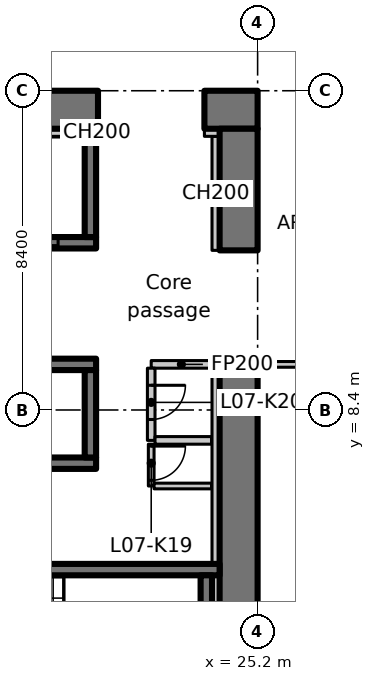
"""IFC4 building model, lengths in metres.
Left out: names, types, materials, properties, quantities, classifications, styles, units other than length and angle.
Written with IfcOpenShell. Run it as: python <this file> out.ifc"""

import sys

from ifc_helpers import new_model, si_unit, direction, frame, frame_2d, origin, place, context, subcontext, project, spatial, rectangle, extrude, element, fill, save


model = new_model("IFC4")
c1 = context("Model", 3, precision=1e-05, world=origin(), true_north=direction((0.0, 1.0)))
c2 = subcontext(c1, "Body", "Model", "MODEL_VIEW")
j1 = project(units=[si_unit("LENGTHUNIT", "METRE"), si_unit("PLANEANGLEUNIT", "RADIAN")], contexts=[c1])
p1 = place(None, origin())
s1 = spatial("IfcSite", under=j1, at=p1, CompositionType="ELEMENT")
p2 = place(p1, origin())
s2 = spatial("IfcBuilding", under=s1, at=p2, CompositionType="ELEMENT")
p3 = place(p2, frame((0.0, 0.0, 40.1)))
s3 = spatial("IfcBuildingStorey", under=s2, at=p3, CompositionType="ELEMENT", Elevation=40.1)
p4 = place(p3, frame((-1.1, 16.3, 0.0), z_axis=(0.0, 0.0, 1.0), x_axis=(1.0, 0.0, 0.0)))
e1 = element("IfcWall", 1, at=p4, inside=s3, PredefinedType="SHEAR", context=c2, shape_type="SweptSolid", body=[
    extrude(rectangle(XDim=22.1, YDim=1.0, at=frame_2d((11.05, 0.0))), origin(), (0.0, 0.0, 1.0), 3.35),
])
p5 = place(p4, frame((3.15, 0.0, 0.0)))
e2 = element("IfcOpeningElement", 2, at=p5, cuts=e1, PredefinedType="OPENING", context=c2, shape_type="SweptSolid", body=[
    extrude(rectangle(XDim=1.1, YDim=2.3, at=frame_2d((0.55, 1.15))), frame((0.0, 0.51, 0.0), z_axis=(0.0, -1.0, 0.0), x_axis=(1.0, 0.0, 0.0)), (0.0, 0.0, 1.0), 1.02),
])
p6 = place(p3, frame((23.8, 16.3, 0.0), z_axis=(0.0, 0.0, 1.0), x_axis=(1.0, 0.0, 0.0)))
e3 = element("IfcWall", 3, at=p6, inside=s3, PredefinedType="SHEAR", context=c2, shape_type="SweptSolid", body=[
    extrude(rectangle(XDim=1.4, YDim=1.0, at=frame_2d((0.7, 0.0))), origin(), (0.0, 0.0, 1.0), 3.35),
])
p7 = place(p3, frame((24.7, 1.0, 0.0), z_axis=(0.0, 0.0, 1.0), x_axis=(0.0, 1.0, 0.0)))
e4 = element("IfcWall", 4, at=p7, inside=s3, PredefinedType="SHEAR", context=c2, shape_type="SweptSolid", body=[
    extrude(rectangle(XDim=8.8, YDim=1.0, at=frame_2d((4.4, 0.0))), origin(), (0.0, 0.0, 1.0), 3.35),
])
p8 = place(p3, frame((24.7, 12.6, 0.0), z_axis=(0.0, 0.0, 1.0), x_axis=(0.0, 1.0, 0.0)))
e5 = element("IfcWall", 5, at=p8, inside=s3, PredefinedType="SHEAR", context=c2, shape_type="SweptSolid", body=[
    extrude(rectangle(XDim=3.2, YDim=1.0, at=frame_2d((1.6, 0.0))), origin(), (0.0, 0.0, 1.0), 3.35),
])
p9 = place(p3, frame((24.1, 12.6, 0.0), z_axis=(0.0, 0.0, 1.0), x_axis=(0.0, 1.0, 0.0)))
e6 = element("IfcWall", 6, at=p9, inside=s3, PredefinedType="PARTITIONING", context=c2, shape_type="SweptSolid", body=[
    extrude(rectangle(XDim=3.0, YDim=0.2, at=frame_2d((1.5, 0.0))), origin(), (0.0, 0.0, 1.0), 3.35),
])
p10 = place(p3, frame((23.8, 15.7, 0.0), z_axis=(0.0, 0.0, 1.0), x_axis=(1.0, 0.0, 0.0)))
e7 = element("IfcWall", 7, at=p10, inside=s3, PredefinedType="PARTITIONING", context=c2, shape_type="SweptSolid", body=[
    extrude(rectangle(XDim=0.4, YDim=0.2, at=frame_2d((0.2, 0.0))), origin(), (0.0, 0.0, 1.0), 3.35),
])
p11 = place(p3, frame((1.0, 7.0, 0.0), z_axis=(0.0, 0.0, 1.0), x_axis=(1.0, 0.0, 0.0)))
e8 = element("IfcWall", 8, at=p11, inside=s3, PredefinedType="SHEAR", context=c2, shape_type="SweptSolid", body=[
    extrude(rectangle(XDim=19.95, YDim=0.3, at=frame_2d((9.975, 0.0))), origin(), (0.0, 0.0, 1.0), 3.35),
])
p12 = place(p3, frame((1.0, 9.6, 0.0), z_axis=(0.0, 0.0, 1.0), x_axis=(1.0, 0.0, 0.0)))
e9 = element("IfcWall", 9, at=p12, inside=s3, PredefinedType="SHEAR", context=c2, shape_type="SweptSolid", body=[
    extrude(rectangle(XDim=19.95, YDim=0.3, at=frame_2d((9.975, 0.0))), origin(), (0.0, 0.0, 1.0), 3.35),
])
p13 = place(p12, frame((1.05, 0.0, 0.0)))
e10 = element("IfcOpeningElement", 10, at=p13, cuts=e9, PredefinedType="OPENING", context=c2, shape_type="SweptSolid", body=[
    extrude(rectangle(XDim=1.1, YDim=2.3, at=frame_2d((0.55, 1.15))), frame((0.0, 0.16, 0.0), z_axis=(0.0, -1.0, 0.0), x_axis=(1.0, 0.0, 0.0)), (0.0, 0.0, 1.0), 0.32),
])
p14 = place(p12, frame((3.85, 0.0, 0.0)))
e11 = element("IfcOpeningElement", 11, at=p14, cuts=e9, PredefinedType="OPENING", context=c2, shape_type="SweptSolid", body=[
    extrude(rectangle(XDim=1.1, YDim=2.3, at=frame_2d((0.55, 1.15))), frame((0.0, 0.16, 0.0), z_axis=(0.0, -1.0, 0.0), x_axis=(1.0, 0.0, 0.0)), (0.0, 0.0, 1.0), 0.32),
])
p15 = place(p12, frame((6.65, 0.0, 0.0)))
e12 = element("IfcOpeningElement", 12, at=p15, cuts=e9, PredefinedType="OPENING", context=c2, shape_type="SweptSolid", body=[
    extrude(rectangle(XDim=1.1, YDim=2.3, at=frame_2d((0.55, 1.15))), frame((0.0, 0.16, 0.0), z_axis=(0.0, -1.0, 0.0), x_axis=(1.0, 0.0, 0.0)), (0.0, 0.0, 1.0), 0.32),
])
p16 = place(p12, frame((9.45, 0.0, 0.0)))
e13 = element("IfcOpeningElement", 13, at=p16, cuts=e9, PredefinedType="OPENING", context=c2, shape_type="SweptSolid", body=[
    extrude(rectangle(XDim=1.1, YDim=2.3, at=frame_2d((0.55, 1.15))), frame((0.0, 0.16, 0.0), z_axis=(0.0, -1.0, 0.0), x_axis=(1.0, 0.0, 0.0)), (0.0, 0.0, 1.0), 0.32),
])
p17 = place(p12, frame((12.25, 0.0, 0.0)))
e14 = element("IfcOpeningElement", 14, at=p17, cuts=e9, PredefinedType="OPENING", context=c2, shape_type="SweptSolid", body=[
    extrude(rectangle(XDim=1.1, YDim=2.3, at=frame_2d((0.55, 1.15))), frame((0.0, 0.16, 0.0), z_axis=(0.0, -1.0, 0.0), x_axis=(1.0, 0.0, 0.0)), (0.0, 0.0, 1.0), 0.32),
])
p18 = place(p12, frame((15.05, 0.0, 0.0)))
e15 = element("IfcOpeningElement", 15, at=p18, cuts=e9, PredefinedType="OPENING", context=c2, shape_type="SweptSolid", body=[
    extrude(rectangle(XDim=1.1, YDim=2.3, at=frame_2d((0.55, 1.15))), frame((0.0, 0.16, 0.0), z_axis=(0.0, -1.0, 0.0), x_axis=(1.0, 0.0, 0.0)), (0.0, 0.0, 1.0), 0.32),
])
p19 = place(p3, frame((20.8, 7.15, 0.0), z_axis=(0.0, 0.0, 1.0), x_axis=(0.0, 1.0, 0.0)))
e16 = element("IfcWall", 16, at=p19, inside=s3, PredefinedType="SHEAR", context=c2, shape_type="SweptSolid", body=[
    extrude(rectangle(XDim=2.3, YDim=0.3, at=frame_2d((1.15, 0.0))), origin(), (0.0, 0.0, 1.0), 3.35),
])
p20 = place(p3, frame((15.05, 12.8, 0.0), z_axis=(0.0, 0.0, 1.0), x_axis=(1.0, 0.0, 0.0)))
e17 = element("IfcWall", 17, at=p20, inside=s3, PredefinedType="SHEAR", context=c2, shape_type="SweptSolid", body=[
    extrude(rectangle(XDim=5.9, YDim=0.3, at=frame_2d((2.95, 0.0))), origin(), (0.0, 0.0, 1.0), 3.35),
])
p21 = place(p20, frame((3.8, 0.0, 0.0)))
e18 = element("IfcOpeningElement", 18, at=p21, cuts=e17, PredefinedType="OPENING", context=c2, shape_type="SweptSolid", body=[
    extrude(rectangle(XDim=1.1, YDim=2.3, at=frame_2d((0.55, 1.15))), frame((0.0, 0.16, 0.0), z_axis=(0.0, -1.0, 0.0), x_axis=(1.0, 0.0, 0.0)), (0.0, 0.0, 1.0), 0.32),
])
p22 = place(p3, frame((20.8, 12.95, 0.0), z_axis=(0.0, 0.0, 1.0), x_axis=(0.0, 1.0, 0.0)))
e19 = element("IfcWall", 19, at=p22, inside=s3, PredefinedType="SHEAR", context=c2, shape_type="SweptSolid", body=[
    extrude(rectangle(XDim=2.85, YDim=0.3, at=frame_2d((1.425, 0.0))), origin(), (0.0, 0.0, 1.0), 3.35),
])
p23 = place(p3, frame((15.8, 4.2, 0.0), z_axis=(0.0, 0.0, 1.0), x_axis=(1.0, 0.0, 0.0)))
e20 = element("IfcWall", 20, at=p23, inside=s3, PredefinedType="SHEAR", context=c2, shape_type="SweptSolid", body=[
    extrude(rectangle(XDim=8.4, YDim=0.3, at=frame_2d((4.2, 0.0))), origin(), (0.0, 0.0, 1.0), 3.35),
])
p24 = place(p23, frame((0.4, 0.0, 0.0)))
e21 = element("IfcOpeningElement", 21, at=p24, cuts=e20, PredefinedType="OPENING", context=c2, shape_type="SweptSolid", body=[
    extrude(rectangle(XDim=1.0, YDim=2.1, at=frame_2d((0.5, 1.05))), frame((0.0, 0.16, 0.0), z_axis=(0.0, -1.0, 0.0), x_axis=(1.0, 0.0, 0.0)), (0.0, 0.0, 1.0), 0.32),
])
p25 = place(p3, frame((23.85, 1.5, 0.0), z_axis=(0.0, 0.0, 1.0), x_axis=(0.0, 1.0, 0.0)))
e22 = element("IfcWall", 22, at=p25, inside=s3, PredefinedType="SHEAR", context=c2, shape_type="SweptSolid", body=[
    extrude(rectangle(XDim=2.55, YDim=0.3, at=frame_2d((1.275, 0.0))), origin(), (0.0, 0.0, 1.0), 3.35),
])
p26 = place(p3, frame((23.988, 9.6, 0.0), z_axis=(0.0, 0.0, 1.0), x_axis=(-1.0, 0.0, 0.0)))
e23 = element("IfcWall", 23, at=p26, inside=s3, PredefinedType="PARTITIONING", context=c2, shape_type="SweptSolid", body=[
    extrude(rectangle(XDim=1.588, YDim=0.2, at=frame_2d((0.794, 0.0))), origin(), (0.0, 0.0, 1.0), 3.35),
])
p27 = place(p3, frame((22.4, 9.5, 0.0), z_axis=(0.0, 0.0, 1.0), x_axis=(0.0, -1.0, 0.0)))
e24 = element("IfcWall", 24, at=p27, inside=s3, PredefinedType="PARTITIONING", context=c2, shape_type="SweptSolid", body=[
    extrude(rectangle(XDim=1.9, YDim=0.2, at=frame_2d((0.95, 0.0))), origin(), (0.0, 0.0, 1.0), 3.35),
])
p28 = place(p27, frame((0.45, 0.0, 0.0)))
e25 = element("IfcOpeningElement", 25, at=p28, cuts=e24, PredefinedType="OPENING", context=c2, shape_type="SweptSolid", body=[
    extrude(rectangle(XDim=0.9, YDim=2.1, at=frame_2d((0.45, 1.05))), frame((0.0, 0.11, 0.0), z_axis=(0.0, -1.0, 0.0), x_axis=(1.0, 0.0, 0.0)), (0.0, 0.0, 1.0), 0.22),
])
p29 = place(p3, frame((22.5, 7.6, 0.0), z_axis=(0.0, 0.0, 1.0), x_axis=(1.0, 0.0, 0.0)))
e26 = element("IfcWall", 26, at=p29, inside=s3, PredefinedType="PARTITIONING", context=c2, shape_type="SweptSolid", body=[
    extrude(rectangle(XDim=1.488, YDim=0.2, at=frame_2d((0.744, 0.0))), origin(), (0.0, 0.0, 1.0), 3.35),
])
p30 = place(p3, frame((22.4, 7.5, 0.0), z_axis=(0.0, 0.0, 1.0), x_axis=(0.0, -1.0, 0.0)))
e27 = element("IfcWall", 27, at=p30, inside=s3, PredefinedType="PARTITIONING", context=c2, shape_type="SweptSolid", body=[
    extrude(rectangle(XDim=1.1, YDim=0.15, at=frame_2d((0.55, 0.0))), origin(), (0.0, 0.0, 1.0), 3.35),
])
p31 = place(p30, frame((0.05, 0.0, 0.0)))
e28 = element("IfcOpeningElement", 28, at=p31, cuts=e27, PredefinedType="OPENING", context=c2, shape_type="SweptSolid", body=[
    extrude(rectangle(XDim=0.9, YDim=2.1, at=frame_2d((0.45, 1.05))), frame((0.0, 0.085, 0.0), z_axis=(0.0, -1.0, 0.0), x_axis=(1.0, 0.0, 0.0)), (0.0, 0.0, 1.0), 0.17),
])
p32 = place(p3, frame((22.475, 6.4, 0.0), z_axis=(0.0, 0.0, 1.0), x_axis=(1.0, 0.0, 0.0)))
e29 = element("IfcWall", 29, at=p32, inside=s3, PredefinedType="PARTITIONING", context=c2, shape_type="SweptSolid", body=[
    extrude(rectangle(XDim=1.513, YDim=0.15, at=frame_2d((0.756, 0.0))), origin(), (0.0, 0.0, 1.0), 3.35),
])
p33 = place(p3, frame((18.15, 15.7, 0.0), z_axis=(0.0, 0.0, 1.0), x_axis=(1.0, 0.0, 0.0)))
e30 = element("IfcWall", 30, at=p33, inside=s3, PredefinedType="PARTITIONING", context=c2, shape_type="SweptSolid", body=[
    extrude(rectangle(XDim=2.5, YDim=0.2, at=frame_2d((1.25, 0.0))), origin(), (0.0, 0.0, 1.0), 3.35),
])
p34 = place(p3, frame((20.95, 15.7, 0.0), z_axis=(0.0, 0.0, 1.0), x_axis=(1.0, 0.0, 0.0)))
e31 = element("IfcWall", 31, at=p34, inside=s3, PredefinedType="PARTITIONING", context=c2, shape_type="SweptSolid", body=[
    extrude(rectangle(XDim=0.05, YDim=0.2, at=frame_2d((0.025, 0.0))), origin(), (0.0, 0.0, 1.0), 3.35),
])
p35 = place(p3, frame((24.1, 1.5, 0.0), z_axis=(0.0, 0.0, 1.0), x_axis=(0.0, 1.0, 0.0)))
e32 = element("IfcWall", 32, at=p35, inside=s3, PredefinedType="PARTITIONING", context=c2, shape_type="SweptSolid", body=[
    extrude(rectangle(XDim=2.55, YDim=0.2, at=frame_2d((1.275, 0.0))), origin(), (0.0, 0.0, 1.0), 3.35),
])
p36 = place(p3, frame((24.1, 4.35, 0.0), z_axis=(0.0, 0.0, 1.0), x_axis=(0.0, 1.0, 0.0)))
e33 = element("IfcWall", 33, at=p36, inside=s3, PredefinedType="PARTITIONING", context=c2, shape_type="SweptSolid", body=[
    extrude(rectangle(XDim=5.45, YDim=0.2, at=frame_2d((2.725, 0.0))), origin(), (0.0, 0.0, 1.0), 3.35),
])
p37 = place(p3, frame((29.4, 9.6, 0.0), z_axis=(0.0, 0.0, 1.0), x_axis=(-1.0, 0.0, 0.0)))
e34 = element("IfcWall", 34, at=p37, inside=s3, PredefinedType="PARTITIONING", context=c2, shape_type="SweptSolid", body=[
    extrude(rectangle(XDim=4.2, YDim=0.15, at=frame_2d((2.1, 0.0))), origin(), (0.0, 0.0, 1.0), 3.33),
])
p38 = place(p21, origin())
e35 = element("IfcDoor", 35, at=p38, inside=s3, OperationType="SLIDING_TO_LEFT", PredefinedType="DOOR", context=c2, shape_type="SweptSolid", body=[
    extrude(rectangle(XDim=1.1, YDim=2.3, at=frame_2d((0.55, 1.15))), frame((0.0, 0.025, 0.0), z_axis=(0.0, -1.0, 0.0), x_axis=(1.0, 0.0, 0.0)), (0.0, 0.0, 1.0), 0.05),
])
fill(e18, e35)
p39 = place(p31, origin())
e36 = element("IfcDoor", 36, at=p39, inside=s3, OperationType="SINGLE_SWING_LEFT", PredefinedType="DOOR", context=c2, shape_type="SweptSolid", body=[
    extrude(rectangle(XDim=0.9, YDim=2.1, at=frame_2d((0.45, 1.05))), frame((0.0, 0.025, 0.0), z_axis=(0.0, -1.0, 0.0), x_axis=(1.0, 0.0, 0.0)), (0.0, 0.0, 1.0), 0.05),
])
fill(e28, e36)
p40 = place(p28, origin())
e37 = element("IfcDoor", 37, at=p40, inside=s3, OperationType="SINGLE_SWING_RIGHT", PredefinedType="DOOR", context=c2, shape_type="SweptSolid", body=[
    extrude(rectangle(XDim=0.9, YDim=2.1, at=frame_2d((0.45, 1.05))), frame((0.0, 0.025, 0.0), z_axis=(0.0, -1.0, 0.0), x_axis=(1.0, 0.0, 0.0)), (0.0, 0.0, 1.0), 0.05),
])
fill(e25, e37)
save(model, sys.argv[1])
